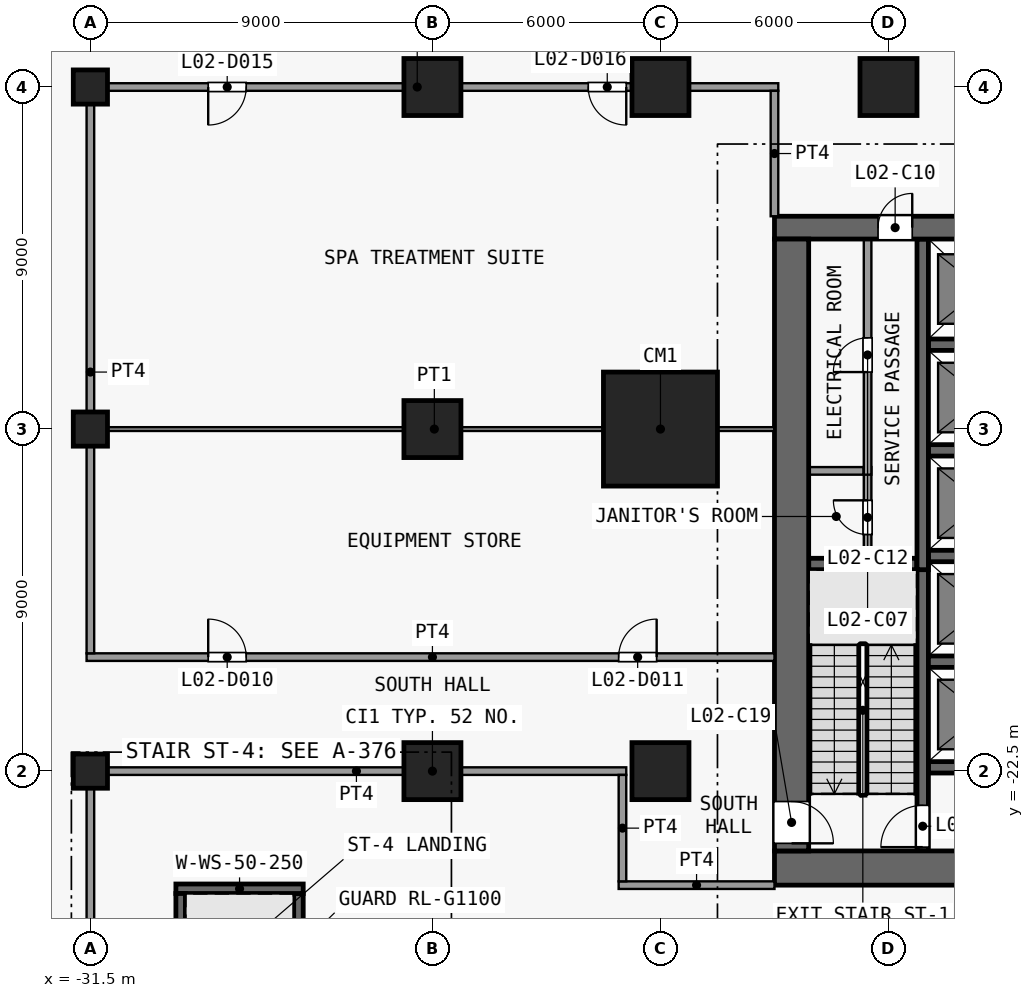
"""IFC4 building model, lengths in metres.
Left out: names, types, materials, properties, quantities, classifications, styles, units other than length and angle.
Written with IfcOpenShell. Run it as: python <this file> out.ifc"""

import sys

from ifc_helpers import new_model, si_unit, direction, frame, frame_2d, origin, origin_2d, place, context, subcontext, project, spatial, rectangle, extrude, element, fill, save


model = new_model("IFC4")
c1 = context("Model", 3, precision=1e-05, world=origin(), true_north=direction((0.0, 1.0)))
c2 = subcontext(c1, "Body", "Model", "MODEL_VIEW")
j1 = project(units=[si_unit("LENGTHUNIT", "METRE"), si_unit("PLANEANGLEUNIT", "RADIAN")], contexts=[c1])
p1 = place(None, origin())
s1 = spatial("IfcSite", under=j1, at=p1, CompositionType="ELEMENT")
p2 = place(p1, origin())
s2 = spatial("IfcBuilding", under=s1, at=p2, CompositionType="ELEMENT")
p3 = place(p2, frame((0.0, 0.0, 13.5)))
s3 = spatial("IfcBuildingStorey", under=s2, at=p3, CompositionType="ELEMENT", Elevation=13.5)
for number, where, z_axis, x_axis in (
    (1, (-31.5, -22.5, 0.0), (0.0, 0.0, 1.0), (1.0, 0.0, 0.0)),
    (2, (-31.5, -13.5, 0.0), (0.0, 0.0, 1.0), (1.0, 0.0, 0.0)),
    (3, (-31.5, -4.5, 0.0), (0.0, 0.0, 1.0), (1.0, 0.0, 0.0)),
):
    element("IfcColumn", number, at=place(p3, frame(where, z_axis=z_axis, x_axis=x_axis)), inside=s3, PredefinedType="COLUMN", context=c2, shape_type="SweptSolid", body=[
        extrude(rectangle(XDim=0.9, YDim=0.9, at=origin_2d()), origin(), (0.0, 0.0, 1.0), 5.0),
    ])
for number, where, z_axis, x_axis in (
    (4, (-22.5, -22.5, 0.0), (0.0, 0.0, 1.0), (1.0, 0.0, 0.0)),
    (5, (-22.5, -13.5, 0.0), (0.0, 0.0, 1.0), (1.0, 0.0, 0.0)),
    (6, (-22.5, -4.5, 0.0), (0.0, 0.0, 1.0), (1.0, 0.0, 0.0)),
    (7, (-16.5, -22.5, 0.0), (0.0, 0.0, 1.0), (1.0, 0.0, 0.0)),
):
    element("IfcColumn", number, at=place(p3, frame(where, z_axis=z_axis, x_axis=x_axis)), inside=s3, PredefinedType="COLUMN", context=c2, shape_type="SweptSolid", body=[
        extrude(rectangle(XDim=1.5, YDim=1.5, at=origin_2d()), origin(), (0.0, 0.0, 1.0), 5.0),
    ])
p4 = place(p3, frame((-16.5, -13.5, 0.0), z_axis=(0.0, 0.0, 1.0), x_axis=(1.0, 0.0, 0.0)))
e8 = element("IfcColumn", 8, at=p4, inside=s3, PredefinedType="COLUMN", context=c2, shape_type="SweptSolid", body=[
    extrude(rectangle(XDim=3.0, YDim=3.0, at=origin_2d()), origin(), (0.0, 0.0, 1.0), 5.0),
])
for number, where, z_axis, x_axis in (
    (9, (-16.5, -4.5, 0.0), (0.0, 0.0, 1.0), (1.0, 0.0, 0.0)),
    (10, (-10.5, -4.5, 0.0), (0.0, 0.0, 1.0), (1.0, 0.0, 0.0)),
):
    element("IfcColumn", number, at=place(p3, frame(where, z_axis=z_axis, x_axis=x_axis)), inside=s3, PredefinedType="COLUMN", context=c2, shape_type="SweptSolid", body=[
        extrude(rectangle(XDim=1.5, YDim=1.5, at=origin_2d()), origin(), (0.0, 0.0, 1.0), 5.0),
    ])
p5 = place(p3, frame((-13.5, -25.05, 0.0), z_axis=(0.0, 0.0, 1.0), x_axis=(1.0, 0.0, 0.0)))
e11 = element("IfcWall", 11, at=p5, inside=s3, PredefinedType="SHEAR", context=c2, shape_type="SweptSolid", body=[
    extrude(rectangle(XDim=27.0, YDim=0.9, at=frame_2d((13.5, 0.0))), origin(), (0.0, 0.0, 1.0), 4.65),
])
p6 = place(p3, frame((-13.5, -8.2, 0.0), z_axis=(0.0, 0.0, 1.0), x_axis=(1.0, 0.0, 0.0)))
e12 = element("IfcWall", 12, at=p6, inside=s3, PredefinedType="SHEAR", context=c2, shape_type="SweptSolid", body=[
    extrude(rectangle(XDim=27.0, YDim=0.6, at=frame_2d((13.5, 0.0))), origin(), (0.0, 0.0, 1.0), 4.65),
])
p7 = place(p6, frame((7.8, 0.0, 0.0)))
e13 = element("IfcOpeningElement", 13, at=p7, cuts=e12, PredefinedType="OPENING", context=c2, shape_type="SweptSolid", body=[
    extrude(rectangle(XDim=1.8, YDim=2.1, at=frame_2d((0.9, 1.05))), frame((0.0, 0.31, 0.0), z_axis=(0.0, -1.0, 0.0), x_axis=(1.0, 0.0, 0.0)), (0.0, 0.0, 1.0), 0.62),
])
p8 = place(p6, frame((17.4, 0.0, 0.0)))
e14 = element("IfcOpeningElement", 14, at=p8, cuts=e12, PredefinedType="OPENING", context=c2, shape_type="SweptSolid", body=[
    extrude(rectangle(XDim=1.8, YDim=2.1, at=frame_2d((0.9, 1.05))), frame((0.0, 0.31, 0.0), z_axis=(0.0, -1.0, 0.0), x_axis=(1.0, 0.0, 0.0)), (0.0, 0.0, 1.0), 0.62),
])
p9 = place(p6, frame((2.725, 0.0, 0.0)))
e15 = element("IfcOpeningElement", 15, at=p9, cuts=e12, PredefinedType="OPENING", context=c2, shape_type="SweptSolid", body=[
    extrude(rectangle(XDim=0.9, YDim=2.1, at=frame_2d((0.45, 1.05))), frame((0.0, 0.31, 0.0), z_axis=(0.0, -1.0, 0.0), x_axis=(1.0, 0.0, 0.0)), (0.0, 0.0, 1.0), 0.62),
])
p10 = place(p6, frame((23.375, 0.0, 0.0)))
e16 = element("IfcOpeningElement", 16, at=p10, cuts=e12, PredefinedType="OPENING", context=c2, shape_type="SweptSolid", body=[
    extrude(rectangle(XDim=0.9, YDim=2.1, at=frame_2d((0.45, 1.05))), frame((0.0, 0.31, 0.0), z_axis=(0.0, -1.0, 0.0), x_axis=(1.0, 0.0, 0.0)), (0.0, 0.0, 1.0), 0.62),
])
p11 = place(p3, frame((-13.05, -8.5, 0.0), z_axis=(0.0, 0.0, 1.0), x_axis=(0.0, -1.0, 0.0)))
e17 = element("IfcWall", 17, at=p11, inside=s3, PredefinedType="SHEAR", context=c2, shape_type="SweptSolid", body=[
    extrude(rectangle(XDim=16.1, YDim=0.9, at=frame_2d((8.05, 0.0))), origin(), (0.0, 0.0, 1.0), 4.65),
])
p12 = place(p11, frame((14.8, 0.0, 0.0)))
e18 = element("IfcOpeningElement", 18, at=p12, cuts=e17, PredefinedType="OPENING", context=c2, shape_type="SweptSolid", body=[
    extrude(rectangle(XDim=1.1, YDim=2.1, at=frame_2d((0.55, 1.05))), frame((0.0, 0.46, 0.0), z_axis=(0.0, -1.0, 0.0), x_axis=(1.0, 0.0, 0.0)), (0.0, 0.0, 1.0), 0.92),
])
for number, where, z_axis, x_axis in (
    (19, (-9.45, -22.4, 0.0), (0.0, 0.0, 1.0), (1.0, 0.0, 0.0)),
    (20, (-9.45, -19.62, 0.0), (0.0, 0.0, 1.0), (1.0, 0.0, 0.0)),
):
    element("IfcWall", number, at=place(p3, frame(where, z_axis=z_axis, x_axis=x_axis)), inside=s3, PredefinedType="SHEAR", context=c2, shape_type="SweptSolid", body=[
        extrude(rectangle(XDim=2.8, YDim=0.3, at=frame_2d((1.4, 0.0))), origin(), (0.0, 0.0, 1.0), 4.65),
    ])
p13 = place(p3, frame((-12.6, -17.05, 0.0), z_axis=(0.0, 0.0, 1.0), x_axis=(1.0, 0.0, 0.0)))
e21 = element("IfcWall", 21, at=p13, inside=s3, PredefinedType="SHEAR", context=c2, shape_type="SweptSolid", body=[
    extrude(rectangle(XDim=2.85, YDim=0.3, at=frame_2d((1.425, 0.0))), origin(), (0.0, 0.0, 1.0), 4.65),
])
p14 = place(p3, frame((-9.45, -16.84, 0.0), z_axis=(0.0, 0.0, 1.0), x_axis=(1.0, 0.0, 0.0)))
e22 = element("IfcWall", 22, at=p14, inside=s3, PredefinedType="SHEAR", context=c2, shape_type="SweptSolid", body=[
    extrude(rectangle(XDim=2.8, YDim=0.3, at=frame_2d((1.4, 0.0))), origin(), (0.0, 0.0, 1.0), 4.65),
])
p15 = place(p3, frame((-12.6, -14.6, 0.0), z_axis=(0.0, 0.0, 1.0), x_axis=(1.0, 0.0, 0.0)))
e23 = element("IfcWall", 23, at=p15, inside=s3, PredefinedType="PARTITIONING", context=c2, shape_type="SweptSolid", body=[
    extrude(rectangle(XDim=1.45, YDim=0.2, at=frame_2d((0.725, 0.0))), origin(), (0.0, 0.0, 1.0), 4.65),
])
for number, where, z_axis, x_axis in (
    (24, (-9.45, -14.06, 0.0), (0.0, 0.0, 1.0), (1.0, 0.0, 0.0)),
    (25, (-9.45, -11.28, 0.0), (0.0, 0.0, 1.0), (1.0, 0.0, 0.0)),
):
    element("IfcWall", number, at=place(p3, frame(where, z_axis=z_axis, x_axis=x_axis)), inside=s3, PredefinedType="SHEAR", context=c2, shape_type="SweptSolid", body=[
        extrude(rectangle(XDim=2.8, YDim=0.3, at=frame_2d((1.4, 0.0))), origin(), (0.0, 0.0, 1.0), 4.65),
    ])
p16 = place(p3, frame((-11.05, -16.9, 0.0), z_axis=(0.0, 0.0, 1.0), x_axis=(0.0, 1.0, 0.0)))
e26 = element("IfcWall", 26, at=p16, inside=s3, PredefinedType="PARTITIONING", context=c2, shape_type="SweptSolid", body=[
    extrude(rectangle(XDim=2.4, YDim=0.2, at=frame_2d((1.2, 0.0))), origin(), (0.0, 0.0, 1.0), 4.65),
])
p17 = place(p16, frame((0.625, 0.0, 0.0)))
e27 = element("IfcOpeningElement", 27, at=p17, cuts=e26, PredefinedType="OPENING", context=c2, shape_type="SweptSolid", body=[
    extrude(rectangle(XDim=0.9, YDim=2.1, at=frame_2d((0.45, 1.05))), frame((0.0, 0.11, 0.0), z_axis=(0.0, -1.0, 0.0), x_axis=(1.0, 0.0, 0.0)), (0.0, 0.0, 1.0), 0.22),
])
p18 = place(p3, frame((-11.05, -14.7, 0.0), z_axis=(0.0, 0.0, 1.0), x_axis=(0.0, 1.0, 0.0)))
e28 = element("IfcWall", 28, at=p18, inside=s3, PredefinedType="PARTITIONING", context=c2, shape_type="SweptSolid", body=[
    extrude(rectangle(XDim=6.2, YDim=0.2, at=frame_2d((3.1, 0.0))), origin(), (0.0, 0.0, 1.0), 4.65),
])
p19 = place(p18, frame((2.7, 0.0, 0.0)))
e29 = element("IfcOpeningElement", 29, at=p19, cuts=e28, PredefinedType="OPENING", context=c2, shape_type="SweptSolid", body=[
    extrude(rectangle(XDim=0.9, YDim=2.1, at=frame_2d((0.45, 1.05))), frame((0.0, 0.11, 0.0), z_axis=(0.0, -1.0, 0.0), x_axis=(1.0, 0.0, 0.0)), (0.0, 0.0, 1.0), 0.22),
])
p20 = place(p3, frame((-9.6, -24.6, 0.0), z_axis=(0.0, 0.0, 1.0), x_axis=(0.0, 1.0, 0.0)))
e30 = element("IfcWall", 30, at=p20, inside=s3, PredefinedType="SHEAR", context=c2, shape_type="SweptSolid", body=[
    extrude(rectangle(XDim=7.7, YDim=0.3, at=frame_2d((3.85, 0.0))), origin(), (0.0, 0.0, 1.0), 4.65),
])
p21 = place(p20, frame((0.1, 0.0, 0.0)))
e31 = element("IfcOpeningElement", 31, at=p21, cuts=e30, PredefinedType="OPENING", context=c2, shape_type="SweptSolid", body=[
    extrude(rectangle(XDim=1.1, YDim=2.1, at=frame_2d((0.55, 1.05))), frame((0.0, 0.16, 0.0), z_axis=(0.0, -1.0, 0.0), x_axis=(1.0, 0.0, 0.0)), (0.0, 0.0, 1.0), 0.32),
])
p22 = place(p3, frame((-9.6, -17.2, 0.0), z_axis=(0.0, 0.0, 1.0), x_axis=(0.0, 1.0, 0.0)))
e32 = element("IfcWall", 32, at=p22, inside=s3, PredefinedType="SHEAR", context=c2, shape_type="SweptSolid", body=[
    extrude(rectangle(XDim=8.7, YDim=0.3, at=frame_2d((4.35, 0.0))), origin(), (0.0, 0.0, 1.0), 4.65),
])
for number, where, z_axis, x_axis in (
    (33, (-29.125, -27.07, 0.0), (0.0, 0.0, 1.0), (0.0, 1.0, 0.0)),
    (34, (-26.025, -27.07, 0.0), (0.0, 0.0, 1.0), (0.0, 1.0, 0.0)),
):
    element("IfcWall", number, at=place(p3, frame(where, z_axis=z_axis, x_axis=x_axis)), inside=s3, PredefinedType="SHEAR", context=c2, shape_type="SweptSolid", body=[
        extrude(rectangle(XDim=1.35, YDim=0.25, at=frame_2d((0.675, 0.0))), origin(), (0.0, 0.0, 1.0), 4.65),
    ])
p23 = place(p3, frame((-29.25, -25.595, 0.0), z_axis=(0.0, 0.0, 1.0), x_axis=(1.0, 0.0, 0.0)))
e35 = element("IfcWall", 35, at=p23, inside=s3, PredefinedType="SHEAR", context=c2, shape_type="SweptSolid", body=[
    extrude(rectangle(XDim=3.35, YDim=0.25, at=frame_2d((1.675, 0.0))), origin(), (0.0, 0.0, 1.0), 4.65),
])
p24 = place(p3, frame((-17.6, -25.5, 0.0), z_axis=(0.0, 0.0, 1.0), x_axis=(1.0, 0.0, 0.0)))
e36 = element("IfcWall", 36, at=p24, inside=s3, PredefinedType="PARTITIONING", context=c2, shape_type="SweptSolid", body=[
    extrude(rectangle(XDim=4.1, YDim=0.2, at=frame_2d((2.05, 0.0))), origin(), (0.0, 0.0, 1.0), 4.65),
])
p25 = place(p3, frame((-31.6, -22.5, 0.0), z_axis=(0.0, 0.0, 1.0), x_axis=(1.0, 0.0, 0.0)))
e37 = element("IfcWall", 37, at=p25, inside=s3, PredefinedType="PARTITIONING", context=c2, shape_type="SweptSolid", body=[
    extrude(rectangle(XDim=14.2, YDim=0.2, at=frame_2d((7.1, 0.0))), origin(), (0.0, 0.0, 1.0), 4.65),
])
p26 = place(p3, frame((-31.6, -19.5, 0.0), z_axis=(0.0, 0.0, 1.0), x_axis=(1.0, 0.0, 0.0)))
e38 = element("IfcWall", 38, at=p26, inside=s3, PredefinedType="PARTITIONING", context=c2, shape_type="SweptSolid", body=[
    extrude(rectangle(XDim=18.1, YDim=0.2, at=frame_2d((9.05, 0.0))), origin(), (0.0, 0.0, 1.0), 4.65),
])
p27 = place(p26, frame((3.2, 0.0, 0.0)))
e39 = element("IfcOpeningElement", 39, at=p27, cuts=e38, PredefinedType="OPENING", context=c2, shape_type="SweptSolid", body=[
    extrude(rectangle(XDim=1.0, YDim=2.1, at=frame_2d((0.5, 1.05))), frame((0.0, 0.11, 0.0), z_axis=(0.0, -1.0, 0.0), x_axis=(1.0, 0.0, 0.0)), (0.0, 0.0, 1.0), 0.22),
])
p28 = place(p26, frame((14.0, 0.0, 0.0)))
e40 = element("IfcOpeningElement", 40, at=p28, cuts=e38, PredefinedType="OPENING", context=c2, shape_type="SweptSolid", body=[
    extrude(rectangle(XDim=1.0, YDim=2.1, at=frame_2d((0.5, 1.05))), frame((0.0, 0.11, 0.0), z_axis=(0.0, -1.0, 0.0), x_axis=(1.0, 0.0, 0.0)), (0.0, 0.0, 1.0), 0.22),
])
p29 = place(p3, frame((-31.4, -13.5, 0.0), z_axis=(0.0, 0.0, 1.0), x_axis=(1.0, 0.0, 0.0)))
e41 = element("IfcWall", 41, at=p29, inside=s3, PredefinedType="PARTITIONING", context=c2, shape_type="SweptSolid", body=[
    extrude(rectangle(XDim=17.9, YDim=0.1, at=frame_2d((8.95, 0.0))), origin(), (0.0, 0.0, 1.0), 4.65),
])
p30 = place(p3, frame((-31.6, -4.5, 0.0), z_axis=(0.0, 0.0, 1.0), x_axis=(1.0, 0.0, 0.0)))
e42 = element("IfcWall", 42, at=p30, inside=s3, PredefinedType="PARTITIONING", context=c2, shape_type="SweptSolid", body=[
    extrude(rectangle(XDim=18.2, YDim=0.2, at=frame_2d((9.1, 0.0))), origin(), (0.0, 0.0, 1.0), 4.65),
])
p31 = place(p30, frame((3.2, 0.0, 0.0)))
e43 = element("IfcOpeningElement", 43, at=p31, cuts=e42, PredefinedType="OPENING", context=c2, shape_type="SweptSolid", body=[
    extrude(rectangle(XDim=1.0, YDim=2.1, at=frame_2d((0.5, 1.05))), frame((0.0, 0.11, 0.0), z_axis=(0.0, -1.0, 0.0), x_axis=(1.0, 0.0, 0.0)), (0.0, 0.0, 1.0), 0.22),
])
p32 = place(p30, frame((13.2, 0.0, 0.0)))
e44 = element("IfcOpeningElement", 44, at=p32, cuts=e42, PredefinedType="OPENING", context=c2, shape_type="SweptSolid", body=[
    extrude(rectangle(XDim=1.0, YDim=2.1, at=frame_2d((0.5, 1.05))), frame((0.0, 0.11, 0.0), z_axis=(0.0, -1.0, 0.0), x_axis=(1.0, 0.0, 0.0)), (0.0, 0.0, 1.0), 0.22),
])
p33 = place(p3, frame((-31.5, -31.4, 0.0), z_axis=(0.0, 0.0, 1.0), x_axis=(0.0, 1.0, 0.0)))
e45 = element("IfcWall", 45, at=p33, inside=s3, PredefinedType="PARTITIONING", context=c2, shape_type="SweptSolid", body=[
    extrude(rectangle(XDim=8.8, YDim=0.2, at=frame_2d((4.4, 0.0))), origin(), (0.0, 0.0, 1.0), 4.65),
])
p34 = place(p3, frame((-31.5, -19.4, 0.0), z_axis=(0.0, 0.0, 1.0), x_axis=(0.0, 1.0, 0.0)))
e46 = element("IfcWall", 46, at=p34, inside=s3, PredefinedType="PARTITIONING", context=c2, shape_type="SweptSolid", body=[
    extrude(rectangle(XDim=14.8, YDim=0.2, at=frame_2d((7.4, 0.0))), origin(), (0.0, 0.0, 1.0), 4.65),
])
p35 = place(p3, frame((-17.5, -25.4, 0.0), z_axis=(0.0, 0.0, 1.0), x_axis=(0.0, 1.0, 0.0)))
e47 = element("IfcWall", 47, at=p35, inside=s3, PredefinedType="PARTITIONING", context=c2, shape_type="SweptSolid", body=[
    extrude(rectangle(XDim=2.8, YDim=0.2, at=frame_2d((1.4, 0.0))), origin(), (0.0, 0.0, 1.0), 4.65),
])
p36 = place(p3, frame((-13.5, -7.9, 0.0), z_axis=(0.0, 0.0, 1.0), x_axis=(0.0, 1.0, 0.0)))
e48 = element("IfcWall", 48, at=p36, inside=s3, PredefinedType="PARTITIONING", context=c2, shape_type="SweptSolid", body=[
    extrude(rectangle(XDim=3.3, YDim=0.2, at=frame_2d((1.65, 0.0))), origin(), (0.0, 0.0, 1.0), 4.65),
])
p37 = place(p19, origin())
e49 = element("IfcDoor", 49, at=p37, inside=s3, OperationType="SINGLE_SWING_LEFT", PredefinedType="DOOR", context=c2, shape_type="SweptSolid", body=[
    extrude(rectangle(XDim=0.9, YDim=2.1, at=frame_2d((0.45, 1.05))), frame((0.0, 0.025, 0.0), z_axis=(0.0, -1.0, 0.0), x_axis=(1.0, 0.0, 0.0)), (0.0, 0.0, 1.0), 0.05),
])
fill(e29, e49)
p38 = place(p9, origin())
e50 = element("IfcDoor", 50, at=p38, inside=s3, OperationType="SINGLE_SWING_RIGHT", PredefinedType="DOOR", context=c2, shape_type="SweptSolid", body=[
    extrude(rectangle(XDim=0.9, YDim=2.1, at=frame_2d((0.45, 1.05))), frame((0.0, 0.025, 0.0), z_axis=(0.0, -1.0, 0.0), x_axis=(1.0, 0.0, 0.0)), (0.0, 0.0, 1.0), 0.05),
])
fill(e15, e50)
p39 = place(p17, origin())
e51 = element("IfcDoor", 51, at=p39, inside=s3, OperationType="SINGLE_SWING_RIGHT", PredefinedType="DOOR", context=c2, shape_type="SweptSolid", body=[
    extrude(rectangle(XDim=0.9, YDim=2.1, at=frame_2d((0.45, 1.05))), frame((0.0, 0.025, 0.0), z_axis=(0.0, -1.0, 0.0), x_axis=(1.0, 0.0, 0.0)), (0.0, 0.0, 1.0), 0.05),
])
fill(e27, e51)
p40 = place(p21, origin())
e52 = element("IfcDoor", 52, at=p40, inside=s3, OperationType="SINGLE_SWING_LEFT", PredefinedType="DOOR", context=c2, shape_type="SweptSolid", body=[
    extrude(rectangle(XDim=1.1, YDim=2.1, at=frame_2d((0.55, 1.05))), frame((0.0, 0.025, 0.0), z_axis=(0.0, -1.0, 0.0), x_axis=(1.0, 0.0, 0.0)), (0.0, 0.0, 1.0), 0.05),
])
fill(e31, e52)
p41 = place(p12, origin())
e53 = element("IfcDoor", 53, at=p41, inside=s3, OperationType="SINGLE_SWING_RIGHT", PredefinedType="DOOR", context=c2, shape_type="SweptSolid", body=[
    extrude(rectangle(XDim=1.1, YDim=2.1, at=frame_2d((0.55, 1.05))), frame((0.0, 0.025, 0.0), z_axis=(0.0, -1.0, 0.0), x_axis=(1.0, 0.0, 0.0)), (0.0, 0.0, 1.0), 0.05),
])
fill(e18, e53)
p42 = place(p27, origin())
e54 = element("IfcDoor", 54, at=p42, inside=s3, OperationType="SINGLE_SWING_RIGHT", PredefinedType="DOOR", context=c2, shape_type="SweptSolid", body=[
    extrude(rectangle(XDim=1.0, YDim=2.1, at=frame_2d((0.5, 1.05))), frame((0.0, 0.025, 0.0), z_axis=(0.0, -1.0, 0.0), x_axis=(1.0, 0.0, 0.0)), (0.0, 0.0, 1.0), 0.05),
])
fill(e39, e54)
p43 = place(p28, origin())
e55 = element("IfcDoor", 55, at=p43, inside=s3, OperationType="SINGLE_SWING_LEFT", PredefinedType="DOOR", context=c2, shape_type="SweptSolid", body=[
    extrude(rectangle(XDim=1.0, YDim=2.1, at=frame_2d((0.5, 1.05))), frame((0.0, 0.025, 0.0), z_axis=(0.0, -1.0, 0.0), x_axis=(1.0, 0.0, 0.0)), (0.0, 0.0, 1.0), 0.05),
])
fill(e40, e55)
p44 = place(p31, origin())
e56 = element("IfcDoor", 56, at=p44, inside=s3, OperationType="SINGLE_SWING_LEFT", PredefinedType="DOOR", context=c2, shape_type="SweptSolid", body=[
    extrude(rectangle(XDim=1.0, YDim=2.1, at=frame_2d((0.5, 1.05))), frame((0.0, 0.025, 0.0), z_axis=(0.0, -1.0, 0.0), x_axis=(1.0, 0.0, 0.0)), (0.0, 0.0, 1.0), 0.05),
])
fill(e43, e56)
p45 = place(p32, origin())
e57 = element("IfcDoor", 57, at=p45, inside=s3, OperationType="SINGLE_SWING_RIGHT", PredefinedType="DOOR", context=c2, shape_type="SweptSolid", body=[
    extrude(rectangle(XDim=1.0, YDim=2.1, at=frame_2d((0.5, 1.05))), frame((0.0, 0.025, 0.0), z_axis=(0.0, -1.0, 0.0), x_axis=(1.0, 0.0, 0.0)), (0.0, 0.0, 1.0), 0.05),
])
fill(e44, e57)
save(model, sys.argv[1])
